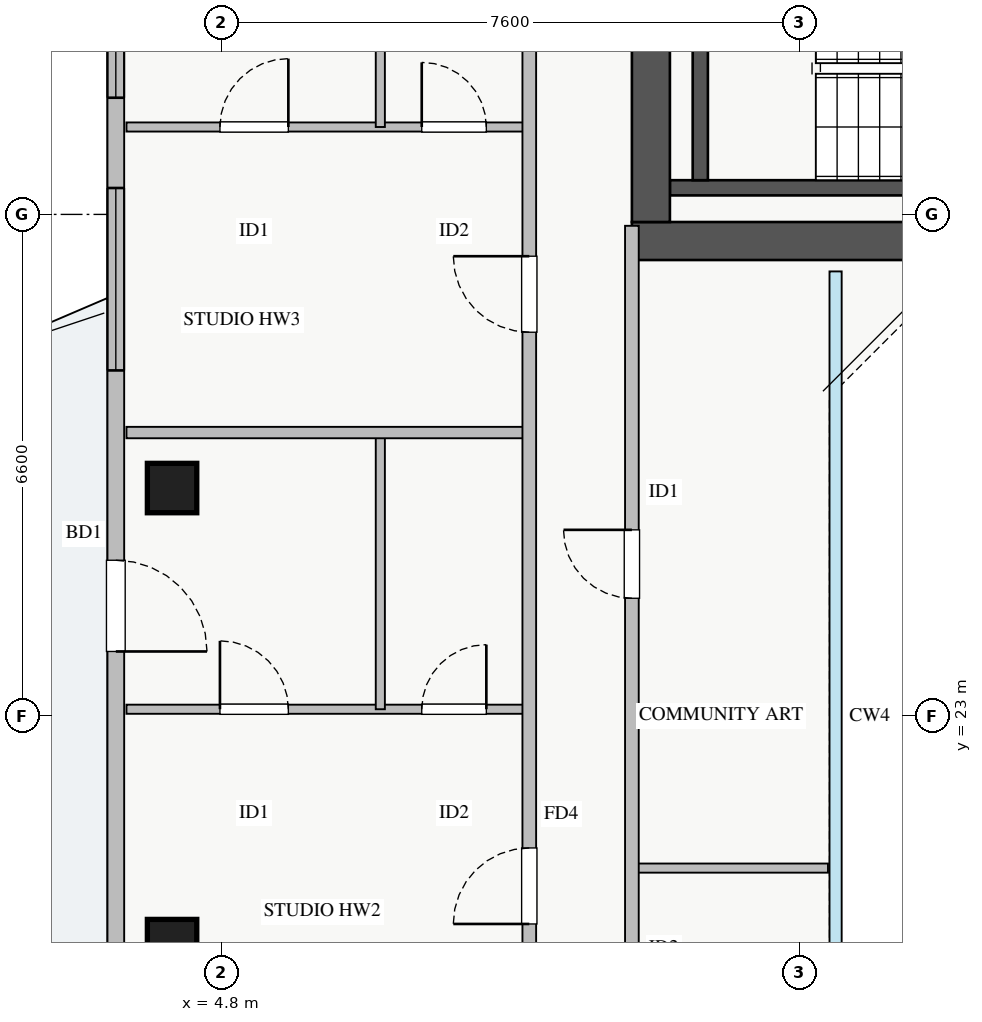
"""IFC4 building model, lengths in metres.
Left out: names, types, materials, properties, quantities, classifications, styles, units other than length and angle.
Written with IfcOpenShell. Run it as: python <this file> out.ifc"""

import sys

from ifc_helpers import new_model, si_unit, direction, frame, frame_2d, origin, origin_2d, place, context, subcontext, project, spatial, rectangle, extrude, source, transform, mapped, element, fill, save


model = new_model("IFC4")
c1 = context("Model", 3, precision=1e-05, world=origin(), true_north=direction((0.0, 1.0)))
c2 = subcontext(c1, "Body", "Model", "MODEL_VIEW")
j1 = project(units=[si_unit("LENGTHUNIT", "METRE"), si_unit("PLANEANGLEUNIT", "RADIAN")], contexts=[c1])
p1 = place(None, origin())
s1 = spatial("IfcSite", under=j1, at=p1, CompositionType="ELEMENT")
p2 = place(p1, origin())
s2 = spatial("IfcBuilding", under=s1, at=p2, CompositionType="ELEMENT")
p3 = place(p2, frame((0.0, 0.0, 256.75)))
s3 = spatial("IfcBuildingStorey", under=s2, at=p3, CompositionType="ELEMENT", Elevation=256.75)
p4 = place(p3, frame((10.7, 29.95, 0.0), z_axis=(0.0, 0.0, 1.0), x_axis=(1.0, 0.0, 0.0)))
e1 = element("IfcWall", 1, at=p4, inside=s3, PredefinedType="SHEAR", context=c2, shape_type="SweptSolid", body=[
    extrude(rectangle(XDim=7.45, YDim=0.2, at=frame_2d((3.725, 0.0))), origin(), (0.0, 0.0, 1.0), 3.25),
])
p5 = place(p3, frame((11.1, 30.05, 0.0), z_axis=(0.0, 0.0, 1.0), x_axis=(0.0, 1.0, 0.0)))
e2 = element("IfcWall", 2, at=p5, inside=s3, PredefinedType="SHEAR", context=c2, shape_type="SweptSolid", body=[
    extrude(rectangle(XDim=2.94, YDim=0.2, at=frame_2d((1.47, 0.0))), origin(), (0.0, 0.0, 1.0), 3.25),
])
p6 = place(p3, frame((10.2, 29.25, 0.0), z_axis=(0.0, 0.0, 1.0), x_axis=(1.0, 0.0, 0.0)))
e3 = element("IfcWall", 3, at=p6, inside=s3, PredefinedType="SHEAR", context=c2, shape_type="SweptSolid", body=[
    extrude(rectangle(XDim=17.6, YDim=0.5, at=frame_2d((8.8, 0.0))), origin(), (0.0, 0.0, 1.0), 3.25),
])
p7 = place(p3, frame((10.45, 29.5, 0.0), z_axis=(0.0, 0.0, 1.0), x_axis=(0.0, 1.0, 0.0)))
e4 = element("IfcWall", 4, at=p7, inside=s3, PredefinedType="SHEAR", context=c2, shape_type="SweptSolid", body=[
    extrude(rectangle(XDim=6.2, YDim=0.5, at=frame_2d((3.1, 0.0))), origin(), (0.0, 0.0, 1.0), 3.25),
])
m1 = source(origin(), c2, "Body", "SweptSolid", [
    extrude(rectangle(XDim=0.65, YDim=0.65, at=origin_2d()), origin(), (0.0, 0.0, 1.0), 3.25),
])
for number, where, z_axis, x_axis in (
    (5, (4.15, 26.0, 0.0), (0.0, 0.0, 1.0), (1.0, 0.0, 0.0)),
    (6, (4.15, 20.0, 0.0), (0.0, 0.0, 1.0), (1.0, 0.0, 0.0)),
):
    element("IfcColumn", number, at=place(p3, frame(where, z_axis=z_axis, x_axis=x_axis)), inside=s3, PredefinedType="COLUMN", context=c2, shape_type="MappedRepresentation", body=[
        mapped(m1, transform((0.0, 0.0, 0.0), x_axis=(1.0, 0.0, 0.0), y_axis=(0.0, 1.0, 0.0), z_axis=(0.0, 0.0, 1.0), scale=1.0)),
    ])
p8 = place(p3, frame((3.41, 12.35, 0.0), z_axis=(0.0, 0.0, 1.0), x_axis=(0.0, 1.0, 0.0)))
e7 = element("IfcWall", 7, at=p8, inside=s3, PredefinedType="STANDARD", context=c2, shape_type="SweptSolid", body=[
    extrude(rectangle(XDim=21.3, YDim=0.22, at=frame_2d((10.65, 0.0))), origin(), (0.0, 0.0, 1.0), 2.61),
])
p9 = place(p8, frame((11.5, 0.0, 0.0)))
e8 = element("IfcOpeningElement", 8, at=p9, cuts=e7, PredefinedType="OPENING", context=c2, shape_type="SweptSolid", body=[
    extrude(rectangle(XDim=1.2, YDim=2.1, at=frame_2d((0.6, 1.05))), frame((0.0, 0.12, 0.0), z_axis=(0.0, -1.0, 0.0), x_axis=(1.0, 0.0, 0.0)), (0.0, 0.0, 1.0), 0.24),
])
p10 = place(p8, frame((0.44, 0.0, 0.9)))
e9 = element("IfcOpeningElement", 9, at=p10, cuts=e7, PredefinedType="OPENING", context=c2, shape_type="SweptSolid", body=[
    extrude(rectangle(XDim=2.4, YDim=1.5, at=frame_2d((1.2, 0.75))), frame((0.0, 0.12, 0.0), z_axis=(0.0, -1.0, 0.0), x_axis=(1.0, 0.0, 0.0)), (0.0, 0.0, 1.0), 0.24),
])
p11 = place(p8, frame((18.785, 0.0, 0.9)))
e10 = element("IfcOpeningElement", 10, at=p11, cuts=e7, PredefinedType="OPENING", context=c2, shape_type="SweptSolid", body=[
    extrude(rectangle(XDim=2.1, YDim=1.5, at=frame_2d((1.05, 0.75))), frame((0.0, 0.12, 0.0), z_axis=(0.0, -1.0, 0.0), x_axis=(1.0, 0.0, 0.0)), (0.0, 0.0, 1.0), 0.24),
])
p12 = place(p8, frame((3.653, 0.0, 0.9)))
e11 = element("IfcOpeningElement", 11, at=p12, cuts=e7, PredefinedType="OPENING", context=c2, shape_type="SweptSolid", body=[
    extrude(rectangle(XDim=2.4, YDim=1.5, at=frame_2d((1.2, 0.75))), frame((0.0, 0.12, 0.0), z_axis=(0.0, -1.0, 0.0), x_axis=(1.0, 0.0, 0.0)), (0.0, 0.0, 1.0), 0.24),
])
p13 = place(p8, frame((15.198, 0.0, 0.9)))
e12 = element("IfcOpeningElement", 12, at=p13, cuts=e7, PredefinedType="OPENING", context=c2, shape_type="SweptSolid", body=[
    extrude(rectangle(XDim=2.4, YDim=1.5, at=frame_2d((1.2, 0.75))), frame((0.0, 0.12, 0.0), z_axis=(0.0, -1.0, 0.0), x_axis=(1.0, 0.0, 0.0)), (0.0, 0.0, 1.0), 0.24),
])
p14 = place(p8, frame((6.705, 0.0, 0.9)))
e13 = element("IfcOpeningElement", 13, at=p14, cuts=e7, PredefinedType="OPENING", context=c2, shape_type="SweptSolid", body=[
    extrude(rectangle(XDim=0.9, YDim=1.2, at=frame_2d((0.45, 0.6))), frame((0.0, 0.12, 0.0), z_axis=(0.0, -1.0, 0.0), x_axis=(1.0, 0.0, 0.0)), (0.0, 0.0, 1.0), 0.24),
])
p15 = place(p3, frame((3.55, 23.09, 0.0), z_axis=(0.0, 0.0, 1.0), x_axis=(1.0, 0.0, 0.0)))
e14 = element("IfcWall", 14, at=p15, inside=s3, PredefinedType="PLUMBINGWALL", context=c2, shape_type="SweptSolid", body=[
    extrude(rectangle(XDim=5.3, YDim=0.12, at=frame_2d((2.65, 0.0))), origin(), (0.0, 0.0, 1.0), 3.07),
])
p16 = place(p15, frame((1.23, 0.0, 0.0)))
e15 = element("IfcOpeningElement", 15, at=p16, cuts=e14, PredefinedType="OPENING", context=c2, shape_type="SweptSolid", body=[
    extrude(rectangle(XDim=0.9, YDim=2.05, at=frame_2d((0.45, 1.025))), frame((0.0, 0.07, 0.0), z_axis=(0.0, -1.0, 0.0), x_axis=(1.0, 0.0, 0.0)), (0.0, 0.0, 1.0), 0.14),
])
p17 = place(p15, frame((3.885, 0.0, 0.0)))
e16 = element("IfcOpeningElement", 16, at=p17, cuts=e14, PredefinedType="OPENING", context=c2, shape_type="SweptSolid", body=[
    extrude(rectangle(XDim=0.85, YDim=2.05, at=frame_2d((0.425, 1.025))), frame((0.0, 0.07, 0.0), z_axis=(0.0, -1.0, 0.0), x_axis=(1.0, 0.0, 0.0)), (0.0, 0.0, 1.0), 0.14),
])
p18 = place(p3, frame((6.89, 23.09, 0.0), z_axis=(0.0, 0.0, 1.0), x_axis=(0.0, 1.0, 0.0)))
e17 = element("IfcWall", 17, at=p18, inside=s3, PredefinedType="PLUMBINGWALL", context=c2, shape_type="SweptSolid", body=[
    extrude(rectangle(XDim=3.64, YDim=0.12, at=frame_2d((1.82, 0.0))), origin(), (0.0, 0.0, 1.0), 3.07),
])
p19 = place(p3, frame((3.55, 30.75, 0.0), z_axis=(0.0, 0.0, 1.0), x_axis=(1.0, 0.0, 0.0)))
e18 = element("IfcWall", 18, at=p19, inside=s3, PredefinedType="PLUMBINGWALL", context=c2, shape_type="SweptSolid", body=[
    extrude(rectangle(XDim=5.3, YDim=0.12, at=frame_2d((2.65, 0.0))), origin(), (0.0, 0.0, 1.0), 3.07),
])
p20 = place(p19, frame((1.23, 0.0, 0.0)))
e19 = element("IfcOpeningElement", 19, at=p20, cuts=e18, PredefinedType="OPENING", context=c2, shape_type="SweptSolid", body=[
    extrude(rectangle(XDim=0.9, YDim=2.05, at=frame_2d((0.45, 1.025))), frame((0.0, 0.07, 0.0), z_axis=(0.0, -1.0, 0.0), x_axis=(1.0, 0.0, 0.0)), (0.0, 0.0, 1.0), 0.14),
])
p21 = place(p19, frame((3.885, 0.0, 0.0)))
e20 = element("IfcOpeningElement", 20, at=p21, cuts=e18, PredefinedType="OPENING", context=c2, shape_type="SweptSolid", body=[
    extrude(rectangle(XDim=0.85, YDim=2.05, at=frame_2d((0.425, 1.025))), frame((0.0, 0.07, 0.0), z_axis=(0.0, -1.0, 0.0), x_axis=(1.0, 0.0, 0.0)), (0.0, 0.0, 1.0), 0.14),
])
p22 = place(p3, frame((6.89, 30.75, 0.0), z_axis=(0.0, 0.0, 1.0), x_axis=(0.0, 1.0, 0.0)))
e21 = element("IfcWall", 21, at=p22, inside=s3, PredefinedType="PLUMBINGWALL", context=c2, shape_type="SweptSolid", body=[
    extrude(rectangle(XDim=3.43, YDim=0.12, at=frame_2d((1.715, 0.0))), origin(), (0.0, 0.0, 1.0), 3.07),
])
p23 = place(p3, frame((3.55, 26.73, 0.0), z_axis=(0.0, 0.0, 1.0), x_axis=(1.0, 0.0, 0.0)))
e22 = element("IfcWall", 22, at=p23, inside=s3, PredefinedType="PARTITIONING", context=c2, shape_type="SweptSolid", body=[
    extrude(rectangle(XDim=5.3, YDim=0.15, at=frame_2d((2.65, 0.0))), origin(), (0.0, 0.0, 1.0), 3.07),
])
p24 = place(p3, frame((8.85, 11.82, 0.0), z_axis=(0.0, 0.0, 1.0), x_axis=(0.0, 1.0, 0.0)))
e23 = element("IfcWall", 23, at=p24, inside=s3, PredefinedType="PARTITIONING", context=c2, shape_type="SweptSolid", body=[
    extrude(rectangle(XDim=22.36, YDim=0.18, at=frame_2d((11.18, 0.0))), origin(), (0.0, 0.0, 1.0), 2.569),
])
p25 = place(p24, frame((1.2, 0.0, 0.0)))
e24 = element("IfcOpeningElement", 24, at=p25, cuts=e23, PredefinedType="OPENING", context=c2, shape_type="SweptSolid", body=[
    extrude(rectangle(XDim=1.0, YDim=2.05, at=frame_2d((0.5, 1.025))), frame((0.0, 0.1, 0.0), z_axis=(0.0, -1.0, 0.0), x_axis=(1.0, 0.0, 0.0)), (0.0, 0.0, 1.0), 0.2),
])
p26 = place(p24, frame((8.445, 0.0, 0.0)))
e25 = element("IfcOpeningElement", 25, at=p26, cuts=e23, PredefinedType="OPENING", context=c2, shape_type="SweptSolid", body=[
    extrude(rectangle(XDim=1.0, YDim=2.05, at=frame_2d((0.5, 1.025))), frame((0.0, 0.1, 0.0), z_axis=(0.0, -1.0, 0.0), x_axis=(1.0, 0.0, 0.0)), (0.0, 0.0, 1.0), 0.2),
])
p27 = place(p24, frame((16.23, 0.0, 0.0)))
e26 = element("IfcOpeningElement", 26, at=p27, cuts=e23, PredefinedType="OPENING", context=c2, shape_type="SweptSolid", body=[
    extrude(rectangle(XDim=1.0, YDim=2.05, at=frame_2d((0.5, 1.025))), frame((0.0, 0.1, 0.0), z_axis=(0.0, -1.0, 0.0), x_axis=(1.0, 0.0, 0.0)), (0.0, 0.0, 1.0), 0.2),
])
p28 = place(p3, frame((10.2, 21.0, 0.0), z_axis=(0.0, 0.0, 1.0), x_axis=(1.0, 0.0, 0.0)))
e27 = element("IfcWall", 27, at=p28, inside=s3, PredefinedType="PLUMBINGWALL", context=c2, shape_type="SweptSolid", body=[
    extrude(rectangle(XDim=2.58, YDim=0.12, at=frame_2d((1.29, 0.0))), origin(), (0.0, 0.0, 1.0), 3.07),
])
p29 = place(p3, frame((10.2, 16.55, 0.0), z_axis=(0.0, 0.0, 1.0), x_axis=(0.0, 1.0, 0.0)))
e28 = element("IfcWall", 28, at=p29, inside=s3, PredefinedType="PARTITIONING", context=c2, shape_type="SweptSolid", body=[
    extrude(rectangle(XDim=12.9, YDim=0.18, at=frame_2d((6.45, 0.0))), origin(), (0.0, 0.0, 1.0), 3.07),
])
p30 = place(p29, frame((2.025, 0.0, 0.0)))
e29 = element("IfcOpeningElement", 29, at=p30, cuts=e28, PredefinedType="OPENING", context=c2, shape_type="SweptSolid", body=[
    extrude(rectangle(XDim=0.85, YDim=2.05, at=frame_2d((0.425, 1.025))), frame((0.0, 0.1, 0.0), z_axis=(0.0, -1.0, 0.0), x_axis=(1.0, 0.0, 0.0)), (0.0, 0.0, 1.0), 0.2),
])
p31 = place(p29, frame((8.0, 0.0, 0.0)))
e30 = element("IfcOpeningElement", 30, at=p31, cuts=e28, PredefinedType="OPENING", context=c2, shape_type="SweptSolid", body=[
    extrude(rectangle(XDim=0.9, YDim=2.05, at=frame_2d((0.45, 1.025))), frame((0.0, 0.1, 0.0), z_axis=(0.0, -1.0, 0.0), x_axis=(1.0, 0.0, 0.0)), (0.0, 0.0, 1.0), 0.2),
])
m2 = source(origin(), c2, "Body", "SweptSolid", [
    extrude(rectangle(XDim=1.2, YDim=2.1, at=frame_2d((0.6, 1.05))), frame((0.0, 0.025, 0.0), z_axis=(0.0, -1.0, 0.0), x_axis=(1.0, 0.0, 0.0)), (0.0, 0.0, 1.0), 0.05),
])
p32 = place(p9, frame((1.2, 0.0, 0.0), z_axis=(0.0, 0.0, 1.0), x_axis=(-1.0, 0.0, 0.0)))
e31 = element("IfcDoor", 31, at=p32, inside=s3, OperationType="SINGLE_SWING_LEFT", PredefinedType="DOOR", context=c2, shape_type="MappedRepresentation", body=[
    mapped(m2, transform((0.0, 0.0, 0.0), x_axis=(1.0, 0.0, 0.0), y_axis=(0.0, 1.0, 0.0), z_axis=(0.0, 0.0, 1.0), scale=1.0)),
])
fill(e8, e31)
m3 = source(origin(), c2, "Body", "SweptSolid", [
    extrude(rectangle(XDim=2.1, YDim=1.5, at=frame_2d((1.05, 0.75))), frame((0.0, 0.03, 0.0), z_axis=(0.0, -1.0, 0.0), x_axis=(1.0, 0.0, 0.0)), (0.0, 0.0, 1.0), 0.06),
])
p33 = place(p11, origin())
e32 = element("IfcWindow", 32, at=p33, inside=s3, PartitioningType="TRIPLE_PANEL_VERTICAL", PredefinedType="WINDOW", context=c2, shape_type="MappedRepresentation", body=[
    mapped(m3, transform((0.0, 0.0, 0.0), x_axis=(1.0, 0.0, 0.0), y_axis=(0.0, 1.0, 0.0), z_axis=(0.0, 0.0, 1.0), scale=1.0)),
])
fill(e10, e32)
m4 = source(origin(), c2, "Body", "SweptSolid", [
    extrude(rectangle(XDim=0.9, YDim=2.05, at=frame_2d((0.45, 1.025))), frame((0.0, 0.025, 0.0), z_axis=(0.0, -1.0, 0.0), x_axis=(1.0, 0.0, 0.0)), (0.0, 0.0, 1.0), 0.05),
])
p34 = place(p16, origin())
e33 = element("IfcDoor", 33, at=p34, inside=s3, OperationType="SINGLE_SWING_LEFT", PredefinedType="DOOR", context=c2, shape_type="MappedRepresentation", body=[
    mapped(m4, transform((0.0, 0.0, 0.0), x_axis=(1.0, 0.0, 0.0), y_axis=(0.0, 1.0, 0.0), z_axis=(0.0, 0.0, 1.0), scale=1.0)),
])
fill(e15, e33)
m5 = source(origin(), c2, "Body", "SweptSolid", [
    extrude(rectangle(XDim=0.85, YDim=2.05, at=frame_2d((0.425, 1.025))), frame((0.0, 0.025, 0.0), z_axis=(0.0, -1.0, 0.0), x_axis=(1.0, 0.0, 0.0)), (0.0, 0.0, 1.0), 0.05),
])
p35 = place(p17, origin())
e34 = element("IfcDoor", 34, at=p35, inside=s3, OperationType="SINGLE_SWING_RIGHT", PredefinedType="DOOR", context=c2, shape_type="MappedRepresentation", body=[
    mapped(m5, transform((0.0, 0.0, 0.0), x_axis=(1.0, 0.0, 0.0), y_axis=(0.0, 1.0, 0.0), z_axis=(0.0, 0.0, 1.0), scale=1.0)),
])
fill(e16, e34)
p36 = place(p20, origin())
e35 = element("IfcDoor", 35, at=p36, inside=s3, OperationType="SINGLE_SWING_RIGHT", PredefinedType="DOOR", context=c2, shape_type="MappedRepresentation", body=[
    mapped(m4, transform((0.0, 0.0, 0.0), x_axis=(1.0, 0.0, 0.0), y_axis=(0.0, 1.0, 0.0), z_axis=(0.0, 0.0, 1.0), scale=1.0)),
])
fill(e19, e35)
p37 = place(p21, origin())
e36 = element("IfcDoor", 36, at=p37, inside=s3, OperationType="SINGLE_SWING_LEFT", PredefinedType="DOOR", context=c2, shape_type="MappedRepresentation", body=[
    mapped(m5, transform((0.0, 0.0, 0.0), x_axis=(1.0, 0.0, 0.0), y_axis=(0.0, 1.0, 0.0), z_axis=(0.0, 0.0, 1.0), scale=1.0)),
])
fill(e20, e36)
m6 = source(origin(), c2, "Body", "SweptSolid", [
    extrude(rectangle(XDim=1.0, YDim=2.05, at=frame_2d((0.5, 1.025))), frame((0.0, 0.025, 0.0), z_axis=(0.0, -1.0, 0.0), x_axis=(1.0, 0.0, 0.0)), (0.0, 0.0, 1.0), 0.05),
])
p38 = place(p26, origin())
e37 = element("IfcDoor", 37, at=p38, inside=s3, OperationType="SINGLE_SWING_LEFT", PredefinedType="DOOR", context=c2, shape_type="MappedRepresentation", body=[
    mapped(m6, transform((0.0, 0.0, 0.0), x_axis=(1.0, 0.0, 0.0), y_axis=(0.0, 1.0, 0.0), z_axis=(0.0, 0.0, 1.0), scale=1.0)),
])
fill(e25, e37)
p39 = place(p27, origin())
e38 = element("IfcDoor", 38, at=p39, inside=s3, OperationType="SINGLE_SWING_RIGHT", PredefinedType="DOOR", context=c2, shape_type="MappedRepresentation", body=[
    mapped(m6, transform((0.0, 0.0, 0.0), x_axis=(1.0, 0.0, 0.0), y_axis=(0.0, 1.0, 0.0), z_axis=(0.0, 0.0, 1.0), scale=1.0)),
])
fill(e26, e38)
p40 = place(p31, origin())
e39 = element("IfcDoor", 39, at=p40, inside=s3, OperationType="SINGLE_SWING_RIGHT", PredefinedType="DOOR", context=c2, shape_type="MappedRepresentation", body=[
    mapped(m4, transform((0.0, 0.0, 0.0), x_axis=(1.0, 0.0, 0.0), y_axis=(0.0, 1.0, 0.0), z_axis=(0.0, 0.0, 1.0), scale=1.0)),
])
fill(e30, e39)
m7 = source(origin(), c2, "Body", "SweptSolid", [
    extrude(rectangle(XDim=2.4, YDim=1.5, at=frame_2d((1.2, 0.75))), frame((0.0, 0.03, 0.0), z_axis=(0.0, -1.0, 0.0), x_axis=(1.0, 0.0, 0.0)), (0.0, 0.0, 1.0), 0.06),
])
p41 = place(p13, origin())
e40 = element("IfcWindow", 40, at=p41, inside=s3, PartitioningType="TRIPLE_PANEL_VERTICAL", PredefinedType="WINDOW", context=c2, shape_type="MappedRepresentation", body=[
    mapped(m7, transform((0.0, 0.0, 0.0), x_axis=(1.0, 0.0, 0.0), y_axis=(0.0, 1.0, 0.0), z_axis=(0.0, 0.0, 1.0), scale=1.0)),
])
fill(e12, e40)
save(model, sys.argv[1])
